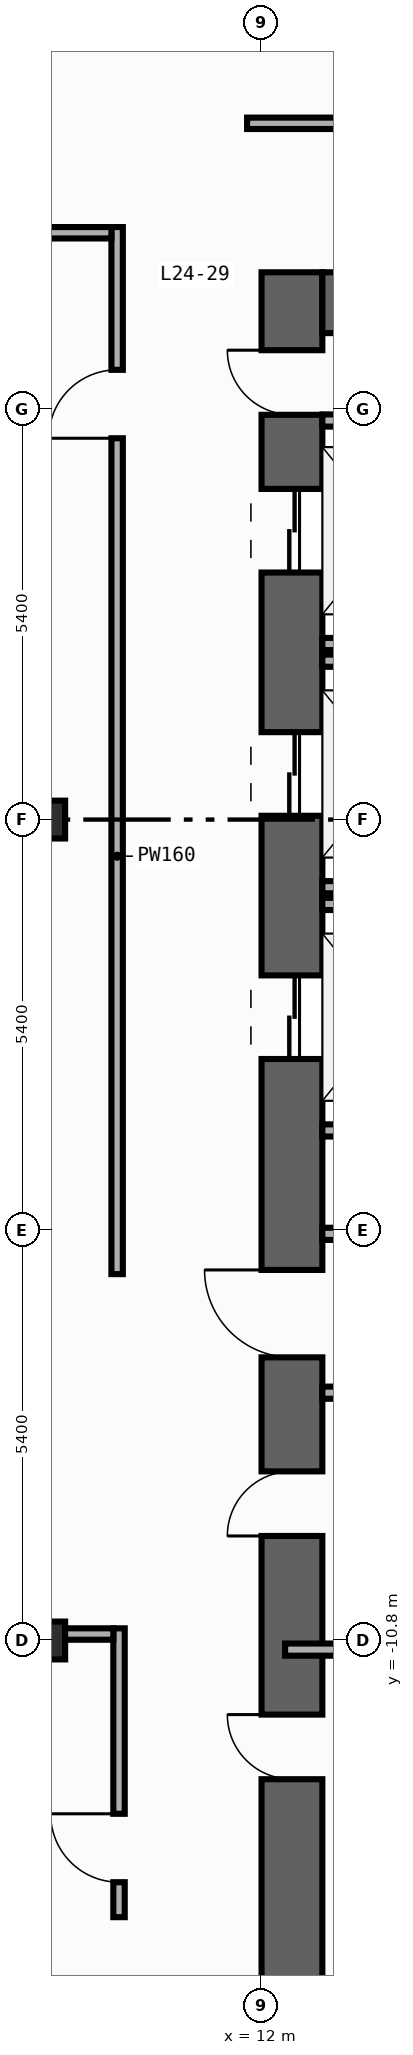
"""IFC4 building model, lengths in metres.
Left out: names, types, materials, properties, quantities, classifications, styles, units other than length and angle.
Written with IfcOpenShell. Run it as: python <this file> out.ifc"""

import sys

from ifc_helpers import new_model, si_unit, direction, frame, frame_2d, origin, origin_2d, place, context, subcontext, project, spatial, rectangle, i_section, extrude, element, fill, save


model = new_model("IFC4")
c1 = context("Model", 3, precision=1e-05, world=origin(), true_north=direction((0.0, 1.0)))
c2 = subcontext(c1, "Body", "Model", "MODEL_VIEW")
j1 = project(units=[si_unit("LENGTHUNIT", "METRE"), si_unit("PLANEANGLEUNIT", "RADIAN")], contexts=[c1])
p1 = place(None, origin())
s1 = spatial("IfcSite", under=j1, at=p1, CompositionType="ELEMENT")
p2 = place(p1, origin())
s2 = spatial("IfcBuilding", under=s1, at=p2, CompositionType="ELEMENT")
p3 = place(p2, frame((0.0, 0.0, 105.8)))
s3 = spatial("IfcBuildingStorey", under=s2, at=p3, CompositionType="ELEMENT", Elevation=105.8)
p4 = place(p3, frame((12.4, -19.8, 0.0), z_axis=(0.0, 0.0, 1.0), x_axis=(0.0, 1.0, 0.0)))
e1 = element("IfcWall", 1, at=p4, inside=s3, PredefinedType="SHEAR", context=c2, shape_type="SweptSolid", body=[
    extrude(rectangle(XDim=27.0, YDim=0.8, at=frame_2d((13.5, 0.0))), origin(), (0.0, 0.0, 1.0), 3.94),
])
p5 = place(p4, frame((23.05, 0.0, 0.0)))
e2 = element("IfcOpeningElement", 2, at=p5, cuts=e1, PredefinedType="OPENING", context=c2, shape_type="SweptSolid", body=[
    extrude(rectangle(XDim=1.1, YDim=2.2, at=frame_2d((0.55, 1.1))), frame((0.0, 0.41, 0.0), z_axis=(0.0, -1.0, 0.0), x_axis=(1.0, 0.0, 0.0)), (0.0, 0.0, 1.0), 0.82),
])
p6 = place(p4, frame((19.85, 0.0, 0.0)))
e3 = element("IfcOpeningElement", 3, at=p6, cuts=e1, PredefinedType="OPENING", context=c2, shape_type="SweptSolid", body=[
    extrude(rectangle(XDim=1.1, YDim=2.2, at=frame_2d((0.55, 1.1))), frame((0.0, 0.41, 0.0), z_axis=(0.0, -1.0, 0.0), x_axis=(1.0, 0.0, 0.0)), (0.0, 0.0, 1.0), 0.82),
])
p7 = place(p4, frame((16.65, 0.0, 0.0)))
e4 = element("IfcOpeningElement", 4, at=p7, cuts=e1, PredefinedType="OPENING", context=c2, shape_type="SweptSolid", body=[
    extrude(rectangle(XDim=1.1, YDim=2.2, at=frame_2d((0.55, 1.1))), frame((0.0, 0.41, 0.0), z_axis=(0.0, -1.0, 0.0), x_axis=(1.0, 0.0, 0.0)), (0.0, 0.0, 1.0), 0.82),
])
p8 = place(p4, frame((7.175, 0.0, 0.0)))
e5 = element("IfcOpeningElement", 5, at=p8, cuts=e1, PredefinedType="OPENING", context=c2, shape_type="SweptSolid", body=[
    extrude(rectangle(XDim=0.85, YDim=2.1, at=frame_2d((0.425, 1.05))), frame((0.0, 0.41, 0.0), z_axis=(0.0, -1.0, 0.0), x_axis=(1.0, 0.0, 0.0)), (0.0, 0.0, 1.0), 0.82),
])
p9 = place(p4, frame((10.375, 0.0, 0.0)))
e6 = element("IfcOpeningElement", 6, at=p9, cuts=e1, PredefinedType="OPENING", context=c2, shape_type="SweptSolid", body=[
    extrude(rectangle(XDim=0.85, YDim=2.1, at=frame_2d((0.425, 1.05))), frame((0.0, 0.41, 0.0), z_axis=(0.0, -1.0, 0.0), x_axis=(1.0, 0.0, 0.0)), (0.0, 0.0, 1.0), 0.82),
])
p10 = place(p4, frame((12.725, 0.0, 0.0)))
e7 = element("IfcOpeningElement", 7, at=p10, cuts=e1, PredefinedType="OPENING", context=c2, shape_type="SweptSolid", body=[
    extrude(rectangle(XDim=1.15, YDim=2.2, at=frame_2d((0.575, 1.1))), frame((0.0, 0.41, 0.0), z_axis=(0.0, -1.0, 0.0), x_axis=(1.0, 0.0, 0.0)), (0.0, 0.0, 1.0), 0.82),
])
p11 = place(p4, frame((25.125, 0.0, 0.0)))
e8 = element("IfcOpeningElement", 8, at=p11, cuts=e1, PredefinedType="OPENING", context=c2, shape_type="SweptSolid", body=[
    extrude(rectangle(XDim=0.85, YDim=2.1, at=frame_2d((0.425, 1.05))), frame((0.0, 0.41, 0.0), z_axis=(0.0, -1.0, 0.0), x_axis=(1.0, 0.0, 0.0)), (0.0, 0.0, 1.0), 0.82),
])
p12 = place(p3, frame((12.8, 6.8, 0.0), z_axis=(0.0, 0.0, 1.0), x_axis=(1.0, 0.0, 0.0)))
e9 = element("IfcWall", 9, at=p12, inside=s3, PredefinedType="SHEAR", context=c2, shape_type="SweptSolid", body=[
    extrude(rectangle(XDim=6.8, YDim=0.8, at=frame_2d((3.4, 0.0))), origin(), (0.0, 0.0, 1.0), 3.94),
])
for number, where, z_axis, x_axis in (
    (10, (9.2, -10.8, 0.0), (0.0, 0.0, 1.0), (1.0, 0.0, 0.0)),
    (11, (9.2, 0.0, 0.0), (0.0, 0.0, 1.0), (1.0, 0.0, 0.0)),
):
    element("IfcColumn", number, at=place(p3, frame(where, z_axis=z_axis, x_axis=x_axis)), inside=s3, PredefinedType="COLUMN", context=c2, shape_type="SweptSolid", body=[
        extrude(i_section(OverallWidth=0.432, OverallDepth=0.498, WebThickness=0.045, FlangeThickness=0.07, FilletRadius=0.022, at=origin_2d()), origin(), (0.0, 0.0, 1.0), 4.2),
    ])
for number, where, z_axis, x_axis in (
    (12, (12.8, 2.31, 0.0), (0.0, 0.0, 1.0), (1.0, 0.0, 0.0)),
    (13, (12.8, -0.89, 0.0), (0.0, 0.0, 1.0), (1.0, 0.0, 0.0)),
    (14, (12.8, 2.09, 0.0), (0.0, 0.0, 1.0), (1.0, 0.0, 0.0)),
    (15, (12.8, -4.09, 0.0), (0.0, 0.0, 1.0), (1.0, 0.0, 0.0)),
    (16, (12.8, -1.11, 0.0), (0.0, 0.0, 1.0), (1.0, 0.0, 0.0)),
):
    element("IfcWall", number, at=place(p3, frame(where, z_axis=z_axis, x_axis=x_axis)), inside=s3, PredefinedType="STANDARD", context=c2, shape_type="SweptSolid", body=[
        extrude(rectangle(XDim=2.19, YDim=0.16, at=frame_2d((1.095, 0.0))), origin(), (0.0, 0.0, 1.0), 3.94),
    ])
for number, where, z_axis, x_axis in (
    (17, (12.8, -5.45, 0.0), (0.0, 0.0, 1.0), (1.0, 0.0, 0.0)),
    (18, (12.8, -7.54, 0.0), (0.0, 0.0, 1.0), (1.0, 0.0, 0.0)),
    (19, (12.8, 5.25, 0.0), (0.0, 0.0, 1.0), (1.0, 0.0, 0.0)),
):
    element("IfcWall", number, at=place(p3, frame(where, z_axis=z_axis, x_axis=x_axis)), inside=s3, PredefinedType="STANDARD", context=c2, shape_type="SweptSolid", body=[
        extrude(rectangle(XDim=2.6, YDim=0.16, at=frame_2d((1.3, 0.0))), origin(), (0.0, 0.0, 1.0), 3.94),
    ])
p13 = place(p3, frame((12.31, -10.92, 0.0), z_axis=(0.0, 0.0, 1.0), x_axis=(1.0, 0.0, 0.0)))
e20 = element("IfcWall", 20, at=p13, inside=s3, PredefinedType="PARTITIONING", context=c2, shape_type="SweptSolid", body=[
    extrude(rectangle(XDim=3.065, YDim=0.16, at=frame_2d((1.532, 0.0))), origin(), (0.0, 0.0, 1.0), 3.24),
])
p14 = place(p3, frame((10.1, -5.98, 0.0), z_axis=(0.0, 0.0, 1.0), x_axis=(0.0, 1.0, 0.0)))
e21 = element("IfcWall", 21, at=p14, inside=s3, PredefinedType="PARTITIONING", context=c2, shape_type="SweptSolid", body=[
    extrude(rectangle(XDim=13.775, YDim=0.15, at=frame_2d((6.887, 0.0))), origin(), (0.0, 0.0, 1.0), 3.94),
])
p15 = place(p14, frame((10.997, 0.0, 0.0)))
e22 = element("IfcOpeningElement", 22, at=p15, cuts=e21, PredefinedType="OPENING", context=c2, shape_type="SweptSolid", body=[
    extrude(rectangle(XDim=0.9, YDim=2.15, at=frame_2d((0.45, 1.075))), frame((0.0, 0.085, 0.0), z_axis=(0.0, -1.0, 0.0), x_axis=(1.0, 0.0, 0.0)), (0.0, 0.0, 1.0), 0.17),
])
p16 = place(p3, frame((10.125, -14.44, 0.0), z_axis=(0.0, 0.0, 1.0), x_axis=(0.0, 1.0, 0.0)))
e23 = element("IfcWall", 23, at=p16, inside=s3, PredefinedType="PARTITIONING", context=c2, shape_type="SweptSolid", body=[
    extrude(rectangle(XDim=3.8, YDim=0.15, at=frame_2d((1.9, 0.0))), origin(), (0.0, 0.0, 1.0), 3.94),
])
p17 = place(p16, frame((0.46, 0.0, 0.0)))
e24 = element("IfcOpeningElement", 24, at=p17, cuts=e23, PredefinedType="OPENING", context=c2, shape_type="SweptSolid", body=[
    extrude(rectangle(XDim=0.9, YDim=2.15, at=frame_2d((0.45, 1.075))), frame((0.0, 0.085, 0.0), z_axis=(0.0, -1.0, 0.0), x_axis=(1.0, 0.0, 0.0)), (0.0, 0.0, 1.0), 0.17),
])
p18 = place(p3, frame((-2.62, 7.72, 0.0), z_axis=(0.0, 0.0, 1.0), x_axis=(1.0, 0.0, 0.0)))
e25 = element("IfcWall", 25, at=p18, inside=s3, PredefinedType="PARTITIONING", context=c2, shape_type="SweptSolid", body=[
    extrude(rectangle(XDim=12.645, YDim=0.15, at=frame_2d((6.323, 0.0))), origin(), (0.0, 0.0, 1.0), 3.94),
])
p19 = place(p18, frame((2.264, 0.0, 0.0)))
e26 = element("IfcOpeningElement", 26, at=p19, cuts=e25, PredefinedType="OPENING", context=c2, shape_type="SweptSolid", body=[
    extrude(rectangle(XDim=0.9, YDim=2.15, at=frame_2d((0.45, 1.075))), frame((0.0, 0.085, 0.0), z_axis=(0.0, -1.0, 0.0), x_axis=(1.0, 0.0, 0.0)), (0.0, 0.0, 1.0), 0.17),
])
p20 = place(p3, frame((-0.015, -10.715, 0.0), z_axis=(0.0, 0.0, 1.0), x_axis=(1.0, 0.0, 0.0)))
e27 = element("IfcWall", 27, at=p20, inside=s3, PredefinedType="PARTITIONING", context=c2, shape_type="SweptSolid", body=[
    extrude(rectangle(XDim=10.065, YDim=0.15, at=frame_2d((5.032, 0.0))), origin(), (0.0, 0.0, 1.0), 3.24),
])
p21 = place(p20, frame((1.063, 0.0, 0.0)))
e28 = element("IfcOpeningElement", 28, at=p21, cuts=e27, PredefinedType="OPENING", context=c2, shape_type="SweptSolid", body=[
    extrude(rectangle(XDim=0.9, YDim=2.15, at=frame_2d((0.45, 1.075))), frame((0.0, 0.085, 0.0), z_axis=(0.0, -1.0, 0.0), x_axis=(1.0, 0.0, 0.0)), (0.0, 0.0, 1.0), 0.17),
])
p22 = place(p3, frame((11.81, 9.16, 0.0), z_axis=(0.0, 0.0, 1.0), x_axis=(1.0, 0.0, 0.0)))
e29 = element("IfcWall", 29, at=p22, inside=s3, PredefinedType="PARTITIONING", context=c2, shape_type="SweptSolid", body=[
    extrude(rectangle(XDim=8.83, YDim=0.15, at=frame_2d((4.415, 0.0))), origin(), (0.0, 0.0, 1.0), 3.94),
])
p23 = place(p22, frame((5.067, 0.0, 0.0)))
e30 = element("IfcOpeningElement", 30, at=p23, cuts=e29, PredefinedType="OPENING", context=c2, shape_type="SweptSolid", body=[
    extrude(rectangle(XDim=0.9, YDim=2.15, at=frame_2d((0.45, 1.075))), frame((0.0, 0.085, 0.0), z_axis=(0.0, -1.0, 0.0), x_axis=(1.0, 0.0, 0.0)), (0.0, 0.0, 1.0), 0.17),
])
p24 = place(p5, origin())
e31 = element("IfcDoor", 31, at=p24, inside=s3, OperationType="DOUBLE_DOOR_SLIDING", PredefinedType="DOOR", context=c2, shape_type="SweptSolid", body=[
    extrude(rectangle(XDim=1.1, YDim=2.2, at=frame_2d((0.55, 1.1))), frame((0.0, 0.025, 0.0), z_axis=(0.0, -1.0, 0.0), x_axis=(1.0, 0.0, 0.0)), (0.0, 0.0, 1.0), 0.05),
])
fill(e2, e31)
p25 = place(p6, origin())
e32 = element("IfcDoor", 32, at=p25, inside=s3, OperationType="DOUBLE_DOOR_SLIDING", PredefinedType="DOOR", context=c2, shape_type="SweptSolid", body=[
    extrude(rectangle(XDim=1.1, YDim=2.2, at=frame_2d((0.55, 1.1))), frame((0.0, 0.025, 0.0), z_axis=(0.0, -1.0, 0.0), x_axis=(1.0, 0.0, 0.0)), (0.0, 0.0, 1.0), 0.05),
])
fill(e3, e32)
p26 = place(p7, origin())
e33 = element("IfcDoor", 33, at=p26, inside=s3, OperationType="DOUBLE_DOOR_SLIDING", PredefinedType="DOOR", context=c2, shape_type="SweptSolid", body=[
    extrude(rectangle(XDim=1.1, YDim=2.2, at=frame_2d((0.55, 1.1))), frame((0.0, 0.025, 0.0), z_axis=(0.0, -1.0, 0.0), x_axis=(1.0, 0.0, 0.0)), (0.0, 0.0, 1.0), 0.05),
])
fill(e4, e33)
p27 = place(p8, origin())
e34 = element("IfcDoor", 34, at=p27, inside=s3, OperationType="SINGLE_SWING_RIGHT", PredefinedType="DOOR", context=c2, shape_type="SweptSolid", body=[
    extrude(rectangle(XDim=0.85, YDim=2.1, at=frame_2d((0.425, 1.05))), frame((0.0, 0.025, 0.0), z_axis=(0.0, -1.0, 0.0), x_axis=(1.0, 0.0, 0.0)), (0.0, 0.0, 1.0), 0.05),
])
fill(e5, e34)
p28 = place(p9, origin())
e35 = element("IfcDoor", 35, at=p28, inside=s3, OperationType="SINGLE_SWING_LEFT", PredefinedType="DOOR", context=c2, shape_type="SweptSolid", body=[
    extrude(rectangle(XDim=0.85, YDim=2.1, at=frame_2d((0.425, 1.05))), frame((0.0, 0.025, 0.0), z_axis=(0.0, -1.0, 0.0), x_axis=(1.0, 0.0, 0.0)), (0.0, 0.0, 1.0), 0.05),
])
fill(e6, e35)
p29 = place(p10, origin())
e36 = element("IfcDoor", 36, at=p29, inside=s3, OperationType="SINGLE_SWING_RIGHT", PredefinedType="DOOR", context=c2, shape_type="SweptSolid", body=[
    extrude(rectangle(XDim=1.15, YDim=2.2, at=frame_2d((0.575, 1.1))), frame((0.0, 0.025, 0.0), z_axis=(0.0, -1.0, 0.0), x_axis=(1.0, 0.0, 0.0)), (0.0, 0.0, 1.0), 0.05),
])
fill(e7, e36)
p30 = place(p11, origin())
e37 = element("IfcDoor", 37, at=p30, inside=s3, OperationType="SINGLE_SWING_RIGHT", PredefinedType="DOOR", context=c2, shape_type="SweptSolid", body=[
    extrude(rectangle(XDim=0.85, YDim=2.1, at=frame_2d((0.425, 1.05))), frame((0.0, 0.025, 0.0), z_axis=(0.0, -1.0, 0.0), x_axis=(1.0, 0.0, 0.0)), (0.0, 0.0, 1.0), 0.05),
])
fill(e8, e37)
p31 = place(p15, origin())
e38 = element("IfcDoor", 38, at=p31, inside=s3, OperationType="SINGLE_SWING_LEFT", PredefinedType="DOOR", context=c2, shape_type="SweptSolid", body=[
    extrude(rectangle(XDim=0.9, YDim=2.15, at=frame_2d((0.45, 1.075))), frame((0.0, 0.025, 0.0), z_axis=(0.0, -1.0, 0.0), x_axis=(1.0, 0.0, 0.0)), (0.0, 0.0, 1.0), 0.05),
])
fill(e22, e38)
p32 = place(p17, origin())
e39 = element("IfcDoor", 39, at=p32, inside=s3, OperationType="SINGLE_SWING_RIGHT", PredefinedType="DOOR", context=c2, shape_type="SweptSolid", body=[
    extrude(rectangle(XDim=0.9, YDim=2.15, at=frame_2d((0.45, 1.075))), frame((0.0, 0.025, 0.0), z_axis=(0.0, -1.0, 0.0), x_axis=(1.0, 0.0, 0.0)), (0.0, 0.0, 1.0), 0.05),
])
fill(e24, e39)
save(model, sys.argv[1])
